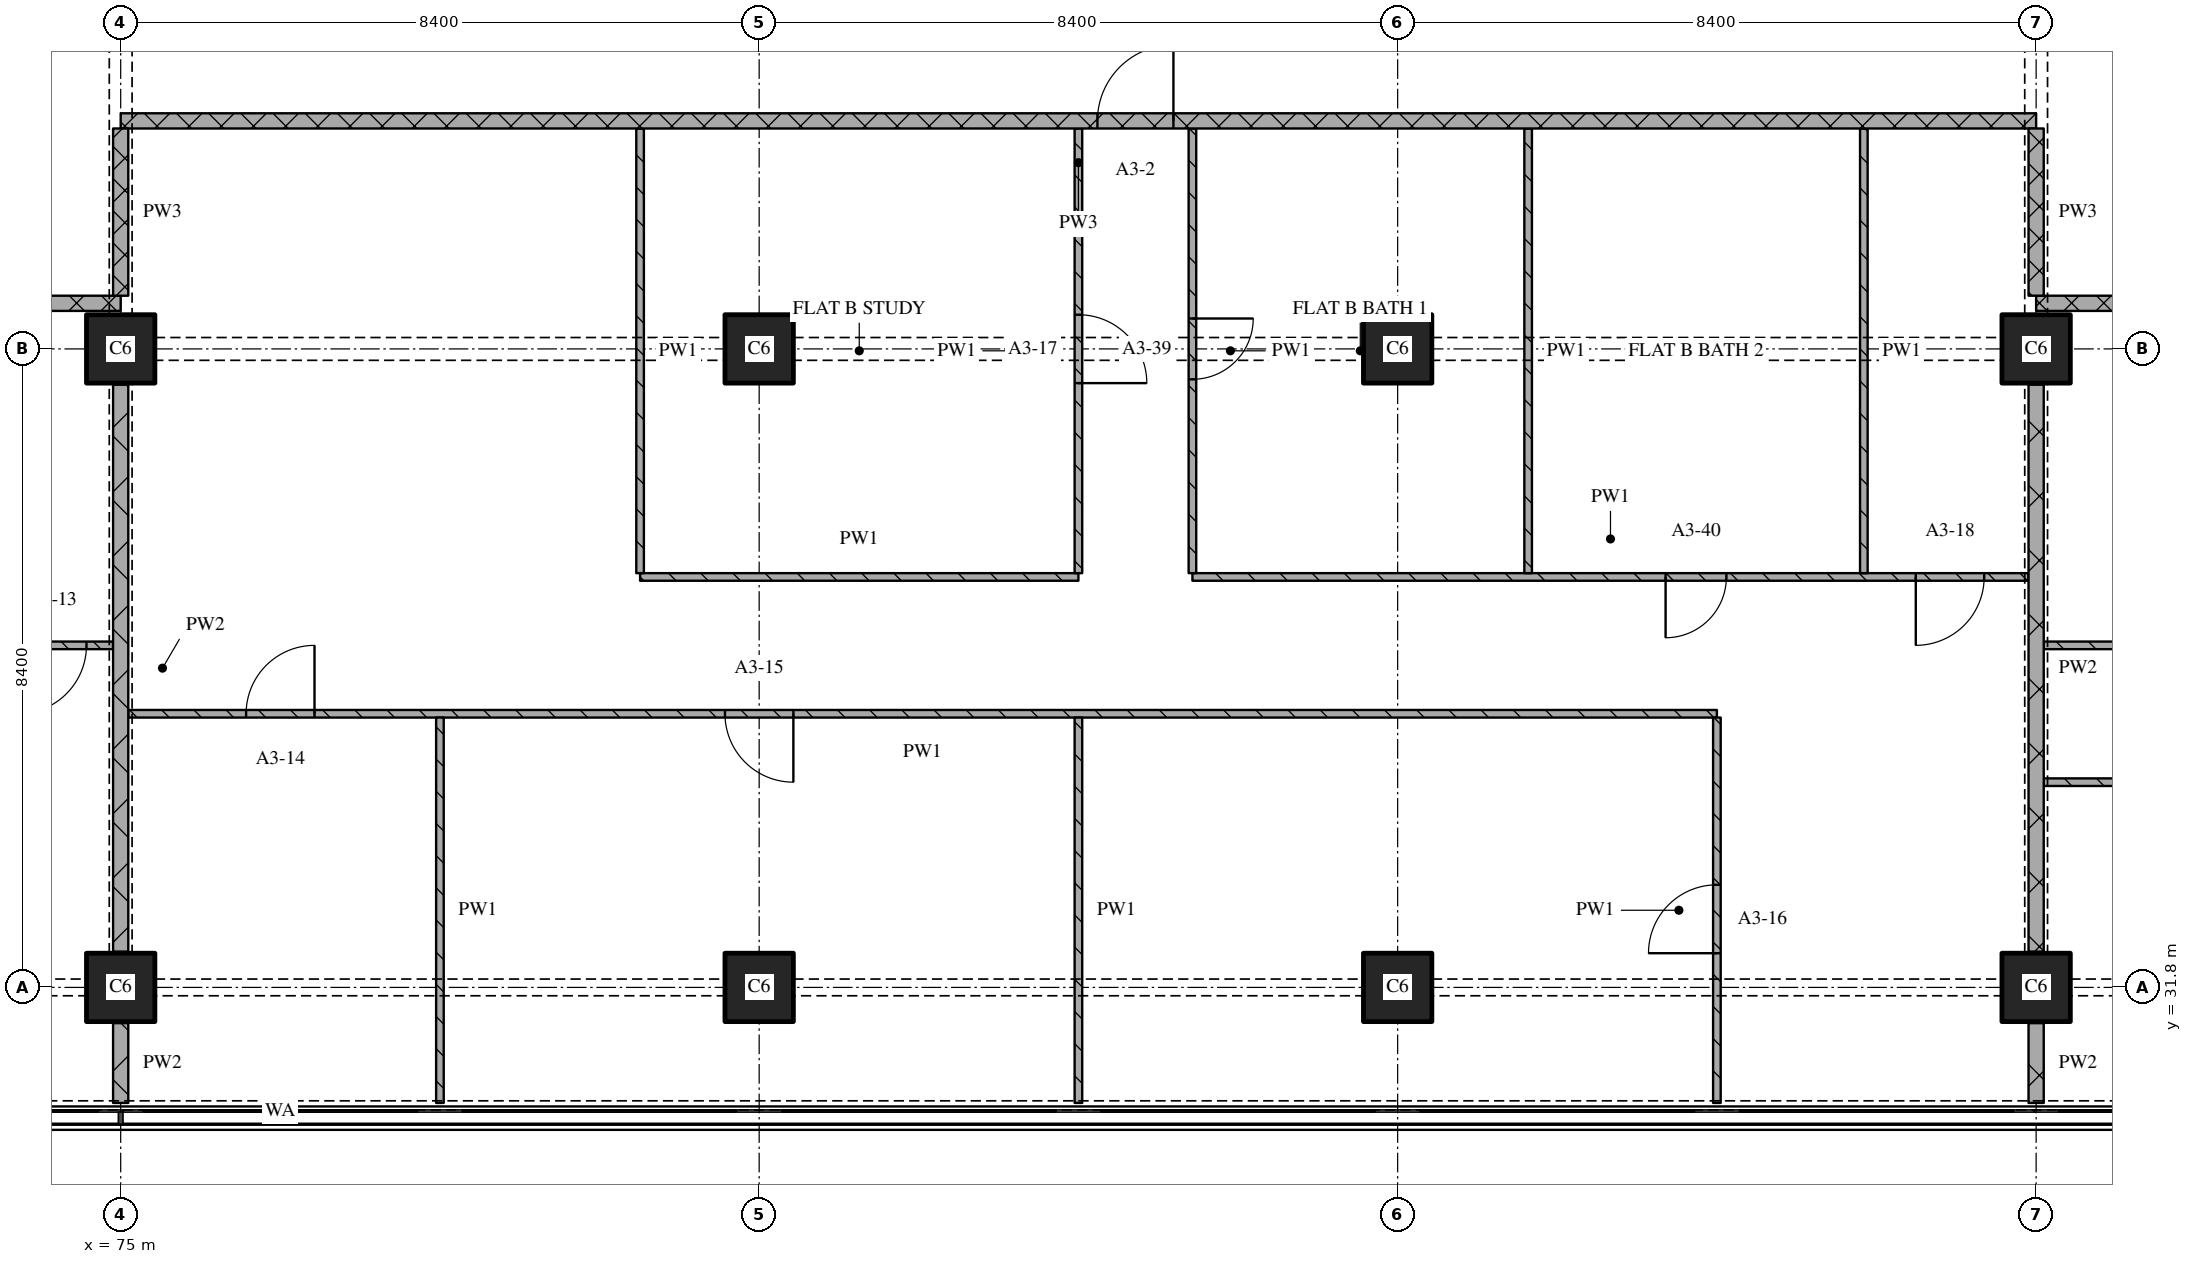
"""IFC4 building model, lengths in metres.
Left out: names, types, materials, properties, quantities, classifications, styles, units other than length and angle.
Written with IfcOpenShell. Run it as: python <this file> out.ifc"""

import sys

from ifc_helpers import new_model, si_unit, direction, frame, frame_2d, origin, origin_2d, place, context, subcontext, project, spatial, rectangle, extrude, element, fill, save


model = new_model("IFC4")
c1 = context("Model", 3, precision=1e-05, world=origin(), true_north=direction((0.0, 1.0)))
c2 = subcontext(c1, "Body", "Model", "MODEL_VIEW")
j1 = project(units=[si_unit("LENGTHUNIT", "METRE"), si_unit("PLANEANGLEUNIT", "RADIAN")], contexts=[c1])
p1 = place(None, origin())
s1 = spatial("IfcSite", under=j1, at=p1, CompositionType="ELEMENT")
p2 = place(p1, origin())
s2 = spatial("IfcBuilding", under=s1, at=p2, CompositionType="ELEMENT")
p3 = place(p2, frame((0.0, 0.0, 66.0)))
s3 = spatial("IfcBuildingStorey", under=s2, at=p3, CompositionType="ELEMENT", Elevation=66.0)
for number, where, z_axis, x_axis in (
    (1, (75.0, 31.8, 0.0), (0.0, 0.0, 1.0), (1.0, 0.0, 0.0)),
    (2, (75.0, 40.2, 0.0), (0.0, 0.0, 1.0), (1.0, 0.0, 0.0)),
    (3, (83.4, 31.8, 0.0), (0.0, 0.0, 1.0), (1.0, 0.0, 0.0)),
    (4, (83.4, 40.2, 0.0), (0.0, 0.0, 1.0), (1.0, 0.0, 0.0)),
    (5, (91.8, 31.8, 0.0), (0.0, 0.0, 1.0), (1.0, 0.0, 0.0)),
    (6, (91.8, 40.2, 0.0), (0.0, 0.0, 1.0), (1.0, 0.0, 0.0)),
    (7, (100.2, 31.8, 0.0), (0.0, 0.0, 1.0), (1.0, 0.0, 0.0)),
    (8, (100.2, 40.2, 0.0), (0.0, 0.0, 1.0), (1.0, 0.0, 0.0)),
):
    element("IfcColumn", number, at=place(p3, frame(where, z_axis=z_axis, x_axis=x_axis)), inside=s3, PredefinedType="COLUMN", context=c2, shape_type="SweptSolid", body=[
        extrude(rectangle(XDim=0.9, YDim=0.9, at=origin_2d()), origin(), (0.0, 0.0, 1.0), 3.6),
    ])
p4 = place(p3, frame((100.3, 34.5, 0.0), z_axis=(0.0, 0.0, 1.0), x_axis=(1.0, 0.0, 0.0)))
e9 = element("IfcWall", 9, at=p4, inside=s3, PredefinedType="PARTITIONING", context=c2, shape_type="SweptSolid", body=[
    extrude(rectangle(XDim=8.3, YDim=0.1, at=frame_2d((4.15, 0.0))), origin(), (0.0, 0.0, 1.0), 3.32),
])
p5 = place(p3, frame((96.0, 35.4, 0.0), z_axis=(0.0, 0.0, 1.0), x_axis=(-1.0, 0.0, 0.0)))
e10 = element("IfcWall", 10, at=p5, inside=s3, PredefinedType="PARTITIONING", context=c2, shape_type="SweptSolid", body=[
    extrude(rectangle(XDim=20.9, YDim=0.1, at=frame_2d((10.45, 0.0))), origin(), (0.0, 0.0, 1.0), 3.32),
])
p6 = place(p5, frame((12.15, 0.0, 0.0)))
e11 = element("IfcOpeningElement", 11, at=p6, cuts=e10, PredefinedType="OPENING", context=c2, shape_type="SweptSolid", body=[
    extrude(rectangle(XDim=0.9, YDim=2.1, at=frame_2d((0.45, 1.05))), frame((0.0, 0.06, 0.0), z_axis=(0.0, -1.0, 0.0), x_axis=(1.0, 0.0, 0.0)), (0.0, 0.0, 1.0), 0.12),
])
p7 = place(p5, frame((18.45, 0.0, 0.0)))
e12 = element("IfcOpeningElement", 12, at=p7, cuts=e10, PredefinedType="OPENING", context=c2, shape_type="SweptSolid", body=[
    extrude(rectangle(XDim=0.9, YDim=2.1, at=frame_2d((0.45, 1.05))), frame((0.0, 0.06, 0.0), z_axis=(0.0, -1.0, 0.0), x_axis=(1.0, 0.0, 0.0)), (0.0, 0.0, 1.0), 0.12),
])
p8 = place(p3, frame((64.2, 36.3, 0.0), z_axis=(0.0, 0.0, 1.0), x_axis=(1.0, 0.0, 0.0)))
e13 = element("IfcWall", 13, at=p8, inside=s3, PredefinedType="PARTITIONING", context=c2, shape_type="SweptSolid", body=[
    extrude(rectangle(XDim=10.7, YDim=0.1, at=frame_2d((5.35, 0.0))), origin(), (0.0, 0.0, 1.0), 3.32),
])
p9 = place(p8, frame((6.35, 0.0, 0.0)))
e14 = element("IfcOpeningElement", 14, at=p9, cuts=e13, PredefinedType="OPENING", context=c2, shape_type="SweptSolid", body=[
    extrude(rectangle(XDim=0.8, YDim=2.1, at=frame_2d((0.4, 1.05))), frame((0.0, 0.06, 0.0), z_axis=(0.0, -1.0, 0.0), x_axis=(1.0, 0.0, 0.0)), (0.0, 0.0, 1.0), 0.12),
])
p10 = place(p8, frame((9.45, 0.0, 0.0)))
e15 = element("IfcOpeningElement", 15, at=p10, cuts=e13, PredefinedType="OPENING", context=c2, shape_type="SweptSolid", body=[
    extrude(rectangle(XDim=0.9, YDim=2.1, at=frame_2d((0.45, 1.05))), frame((0.0, 0.06, 0.0), z_axis=(0.0, -1.0, 0.0), x_axis=(1.0, 0.0, 0.0)), (0.0, 0.0, 1.0), 0.12),
])
p11 = place(p3, frame((100.3, 36.3, 0.0), z_axis=(0.0, 0.0, 1.0), x_axis=(1.0, 0.0, 0.0)))
e16 = element("IfcWall", 16, at=p11, inside=s3, PredefinedType="PARTITIONING", context=c2, shape_type="SweptSolid", body=[
    extrude(rectangle(XDim=10.7, YDim=0.1, at=frame_2d((5.35, 0.0))), origin(), (0.0, 0.0, 1.0), 3.32),
])
p12 = place(p11, frame((1.75, 0.0, 0.0)))
e17 = element("IfcOpeningElement", 17, at=p12, cuts=e16, PredefinedType="OPENING", context=c2, shape_type="SweptSolid", body=[
    extrude(rectangle(XDim=0.8, YDim=2.1, at=frame_2d((0.4, 1.05))), frame((0.0, 0.06, 0.0), z_axis=(0.0, -1.0, 0.0), x_axis=(1.0, 0.0, 0.0)), (0.0, 0.0, 1.0), 0.12),
])
p13 = place(p11, frame((6.25, 0.0, 0.0)))
e18 = element("IfcOpeningElement", 18, at=p13, cuts=e16, PredefinedType="OPENING", context=c2, shape_type="SweptSolid", body=[
    extrude(rectangle(XDim=0.8, YDim=2.1, at=frame_2d((0.4, 1.05))), frame((0.0, 0.06, 0.0), z_axis=(0.0, -1.0, 0.0), x_axis=(1.0, 0.0, 0.0)), (0.0, 0.0, 1.0), 0.12),
])
p14 = place(p3, frame((81.833, 37.2, 0.0), z_axis=(0.0, 0.0, 1.0), x_axis=(1.0, 0.0, 0.0)))
e19 = element("IfcWall", 19, at=p14, inside=s3, PredefinedType="PARTITIONING", context=c2, shape_type="SweptSolid", body=[
    extrude(rectangle(XDim=5.767, YDim=0.1, at=frame_2d((2.883, 0.0))), origin(), (0.0, 0.0, 1.0), 3.32),
])
p15 = place(p3, frame((89.1, 37.2, 0.0), z_axis=(0.0, 0.0, 1.0), x_axis=(1.0, 0.0, 0.0)))
e20 = element("IfcWall", 20, at=p15, inside=s3, PredefinedType="PARTITIONING", context=c2, shape_type="SweptSolid", body=[
    extrude(rectangle(XDim=11.0, YDim=0.1, at=frame_2d((5.5, 0.0))), origin(), (0.0, 0.0, 1.0), 3.32),
])
p16 = place(p15, frame((6.225, 0.0, 0.0)))
e21 = element("IfcOpeningElement", 21, at=p16, cuts=e20, PredefinedType="OPENING", context=c2, shape_type="SweptSolid", body=[
    extrude(rectangle(XDim=0.8, YDim=2.1, at=frame_2d((0.4, 1.05))), frame((0.0, 0.06, 0.0), z_axis=(0.0, -1.0, 0.0), x_axis=(1.0, 0.0, 0.0)), (0.0, 0.0, 1.0), 0.12),
])
p17 = place(p15, frame((9.517, 0.0, 0.0)))
e22 = element("IfcOpeningElement", 22, at=p17, cuts=e20, PredefinedType="OPENING", context=c2, shape_type="SweptSolid", body=[
    extrude(rectangle(XDim=0.9, YDim=2.1, at=frame_2d((0.45, 1.05))), frame((0.0, 0.06, 0.0), z_axis=(0.0, -1.0, 0.0), x_axis=(1.0, 0.0, 0.0)), (0.0, 0.0, 1.0), 0.12),
])
p18 = place(p3, frame((75.0, 40.8, 0.0), z_axis=(0.0, 0.0, 1.0), x_axis=(-1.0, 0.0, 0.0)))
e23 = element("IfcWall", 23, at=p18, inside=s3, PredefinedType="PARTITIONING", context=c2, shape_type="SweptSolid", body=[
    extrude(rectangle(XDim=24.08, YDim=0.2, at=frame_2d((12.04, 0.0))), origin(), (0.0, 0.0, 1.0), 3.32),
])
p19 = place(p18, frame((11.05, 0.0, 0.0)))
e24 = element("IfcOpeningElement", 24, at=p19, cuts=e23, PredefinedType="OPENING", context=c2, shape_type="SweptSolid", body=[
    extrude(rectangle(XDim=1.0, YDim=2.1, at=frame_2d((0.5, 1.05))), frame((0.0, 0.11, 0.0), z_axis=(0.0, -1.0, 0.0), x_axis=(1.0, 0.0, 0.0)), (0.0, 0.0, 1.0), 0.22),
])
p20 = place(p3, frame((124.28, 40.8, 0.0), z_axis=(0.0, 0.0, 1.0), x_axis=(-1.0, 0.0, 0.0)))
e25 = element("IfcWall", 25, at=p20, inside=s3, PredefinedType="PARTITIONING", context=c2, shape_type="SweptSolid", body=[
    extrude(rectangle(XDim=24.08, YDim=0.2, at=frame_2d((12.04, 0.0))), origin(), (0.0, 0.0, 1.0), 3.32),
])
p21 = place(p20, frame((12.03, 0.0, 0.0)))
e26 = element("IfcOpeningElement", 26, at=p21, cuts=e25, PredefinedType="OPENING", context=c2, shape_type="SweptSolid", body=[
    extrude(rectangle(XDim=1.0, YDim=2.1, at=frame_2d((0.5, 1.05))), frame((0.0, 0.11, 0.0), z_axis=(0.0, -1.0, 0.0), x_axis=(1.0, 0.0, 0.0)), (0.0, 0.0, 1.0), 0.22),
])
p22 = place(p3, frame((100.2, 43.2, 0.0), z_axis=(0.0, 0.0, 1.0), x_axis=(-1.0, 0.0, 0.0)))
e27 = element("IfcWall", 27, at=p22, inside=s3, PredefinedType="PARTITIONING", context=c2, shape_type="SweptSolid", body=[
    extrude(rectangle(XDim=25.2, YDim=0.2, at=frame_2d((12.6, 0.0))), origin(), (0.0, 0.0, 1.0), 3.32),
])
p23 = place(p22, frame((11.35, 0.0, 0.0)))
e28 = element("IfcOpeningElement", 28, at=p23, cuts=e27, PredefinedType="OPENING", context=c2, shape_type="SweptSolid", body=[
    extrude(rectangle(XDim=1.0, YDim=2.1, at=frame_2d((0.5, 1.05))), frame((0.0, 0.11, 0.0), z_axis=(0.0, -1.0, 0.0), x_axis=(1.0, 0.0, 0.0)), (0.0, 0.0, 1.0), 0.22),
])
p24 = place(p3, frame((75.0, 43.1, 0.0), z_axis=(0.0, 0.0, 1.0), x_axis=(0.0, -1.0, 0.0)))
e29 = element("IfcWall", 29, at=p24, inside=s3, PredefinedType="PARTITIONING", context=c2, shape_type="SweptSolid", body=[
    extrude(rectangle(XDim=2.2, YDim=0.2, at=frame_2d((1.1, 0.0))), origin(), (0.0, 0.0, 1.0), 2.43),
])
p25 = place(p3, frame((75.0, 31.33, 0.0), z_axis=(0.0, 0.0, 1.0), x_axis=(0.0, -1.0, 0.0)))
e30 = element("IfcWall", 30, at=p25, inside=s3, PredefinedType="PARTITIONING", context=c2, shape_type="SweptSolid", body=[
    extrude(rectangle(XDim=1.05, YDim=0.2, at=frame_2d((0.525, 0.0))), origin(), (0.0, 0.0, 1.0), 3.32),
])
p26 = place(p3, frame((75.0, 39.73, 0.0), z_axis=(0.0, 0.0, 1.0), x_axis=(0.0, -1.0, 0.0)))
e31 = element("IfcWall", 31, at=p26, inside=s3, PredefinedType="PARTITIONING", context=c2, shape_type="SweptSolid", body=[
    extrude(rectangle(XDim=7.46, YDim=0.2, at=frame_2d((3.73, 0.0))), origin(), (0.0, 0.0, 1.0), 2.83),
])
p27 = place(p3, frame((79.2, 35.35, 0.0), z_axis=(0.0, 0.0, 1.0), x_axis=(0.0, -1.0, 0.0)))
e32 = element("IfcWall", 32, at=p27, inside=s3, PredefinedType="PARTITIONING", context=c2, shape_type="SweptSolid", body=[
    extrude(rectangle(XDim=5.07, YDim=0.1, at=frame_2d((2.535, 0.0))), origin(), (0.0, 0.0, 1.0), 3.32),
])
p28 = place(p3, frame((81.833, 43.1, 0.0), z_axis=(0.0, 0.0, 1.0), x_axis=(0.0, -1.0, 0.0)))
e33 = element("IfcWall", 33, at=p28, inside=s3, PredefinedType="PARTITIONING", context=c2, shape_type="SweptSolid", body=[
    extrude(rectangle(XDim=5.85, YDim=0.1, at=frame_2d((2.925, 0.0))), origin(), (0.0, 0.0, 1.0), 3.32),
])
p29 = place(p3, frame((87.6, 35.35, 0.0), z_axis=(0.0, 0.0, 1.0), x_axis=(0.0, -1.0, 0.0)))
e34 = element("IfcWall", 34, at=p29, inside=s3, PredefinedType="PARTITIONING", context=c2, shape_type="SweptSolid", body=[
    extrude(rectangle(XDim=5.07, YDim=0.1, at=frame_2d((2.535, 0.0))), origin(), (0.0, 0.0, 1.0), 3.32),
])
p30 = place(p3, frame((87.6, 37.25, 0.0), z_axis=(0.0, 0.0, 1.0), x_axis=(0.0, 1.0, 0.0)))
e35 = element("IfcWall", 35, at=p30, inside=s3, PredefinedType="PARTITIONING", context=c2, shape_type="SweptSolid", body=[
    extrude(rectangle(XDim=5.85, YDim=0.1, at=frame_2d((2.925, 0.0))), origin(), (0.0, 0.0, 1.0), 3.32),
])
p31 = place(p30, frame((2.5, 0.0, 0.0)))
e36 = element("IfcOpeningElement", 36, at=p31, cuts=e35, PredefinedType="OPENING", context=c2, shape_type="SweptSolid", body=[
    extrude(rectangle(XDim=0.9, YDim=2.1, at=frame_2d((0.45, 1.05))), frame((0.0, 0.06, 0.0), z_axis=(0.0, -1.0, 0.0), x_axis=(1.0, 0.0, 0.0)), (0.0, 0.0, 1.0), 0.12),
])
p32 = place(p3, frame((89.1, 43.1, 0.0), z_axis=(0.0, 0.0, 1.0), x_axis=(0.0, -1.0, 0.0)))
e37 = element("IfcWall", 37, at=p32, inside=s3, PredefinedType="PARTITIONING", context=c2, shape_type="SweptSolid", body=[
    extrude(rectangle(XDim=5.85, YDim=0.1, at=frame_2d((2.925, 0.0))), origin(), (0.0, 0.0, 1.0), 3.32),
])
p33 = place(p32, frame((2.5, 0.0, 0.0)))
e38 = element("IfcOpeningElement", 38, at=p33, cuts=e37, PredefinedType="OPENING", context=c2, shape_type="SweptSolid", body=[
    extrude(rectangle(XDim=0.8, YDim=2.1, at=frame_2d((0.4, 1.05))), frame((0.0, 0.06, 0.0), z_axis=(0.0, -1.0, 0.0), x_axis=(1.0, 0.0, 0.0)), (0.0, 0.0, 1.0), 0.12),
])
p34 = place(p3, frame((93.517, 43.1, 0.0), z_axis=(0.0, 0.0, 1.0), x_axis=(0.0, -1.0, 0.0)))
e39 = element("IfcWall", 39, at=p34, inside=s3, PredefinedType="PARTITIONING", context=c2, shape_type="SweptSolid", body=[
    extrude(rectangle(XDim=5.85, YDim=0.1, at=frame_2d((2.925, 0.0))), origin(), (0.0, 0.0, 1.0), 3.32),
])
p35 = place(p3, frame((96.0, 30.28, 0.0), z_axis=(0.0, 0.0, 1.0), x_axis=(0.0, 1.0, 0.0)))
e40 = element("IfcWall", 40, at=p35, inside=s3, PredefinedType="PARTITIONING", context=c2, shape_type="SweptSolid", body=[
    extrude(rectangle(XDim=5.07, YDim=0.1, at=frame_2d((2.535, 0.0))), origin(), (0.0, 0.0, 1.0), 3.32),
])
p36 = place(p35, frame((1.97, 0.0, 0.0)))
e41 = element("IfcOpeningElement", 41, at=p36, cuts=e40, PredefinedType="OPENING", context=c2, shape_type="SweptSolid", body=[
    extrude(rectangle(XDim=0.9, YDim=2.1, at=frame_2d((0.45, 1.05))), frame((0.0, 0.06, 0.0), z_axis=(0.0, -1.0, 0.0), x_axis=(1.0, 0.0, 0.0)), (0.0, 0.0, 1.0), 0.12),
])
p37 = place(p3, frame((97.933, 43.1, 0.0), z_axis=(0.0, 0.0, 1.0), x_axis=(0.0, -1.0, 0.0)))
e42 = element("IfcWall", 42, at=p37, inside=s3, PredefinedType="PARTITIONING", context=c2, shape_type="SweptSolid", body=[
    extrude(rectangle(XDim=5.85, YDim=0.1, at=frame_2d((2.925, 0.0))), origin(), (0.0, 0.0, 1.0), 3.32),
])
p38 = place(p3, frame((100.2, 43.1, 0.0), z_axis=(0.0, 0.0, 1.0), x_axis=(0.0, -1.0, 0.0)))
e43 = element("IfcWall", 43, at=p38, inside=s3, PredefinedType="PARTITIONING", context=c2, shape_type="SweptSolid", body=[
    extrude(rectangle(XDim=2.2, YDim=0.2, at=frame_2d((1.1, 0.0))), origin(), (0.0, 0.0, 1.0), 2.43),
])
p39 = place(p3, frame((100.2, 31.33, 0.0), z_axis=(0.0, 0.0, 1.0), x_axis=(0.0, -1.0, 0.0)))
e44 = element("IfcWall", 44, at=p39, inside=s3, PredefinedType="PARTITIONING", context=c2, shape_type="SweptSolid", body=[
    extrude(rectangle(XDim=1.05, YDim=0.2, at=frame_2d((0.525, 0.0))), origin(), (0.0, 0.0, 1.0), 3.32),
])
p40 = place(p3, frame((100.2, 39.73, 0.0), z_axis=(0.0, 0.0, 1.0), x_axis=(0.0, -1.0, 0.0)))
e45 = element("IfcWall", 45, at=p40, inside=s3, PredefinedType="PARTITIONING", context=c2, shape_type="SweptSolid", body=[
    extrude(rectangle(XDim=7.46, YDim=0.2, at=frame_2d((3.73, 0.0))), origin(), (0.0, 0.0, 1.0), 2.83),
])
p41 = place(p6, origin())
e46 = element("IfcDoor", 46, at=p41, inside=s3, OperationType="SINGLE_SWING_LEFT", PredefinedType="DOOR", context=c2, shape_type="SweptSolid", body=[
    extrude(rectangle(XDim=0.9, YDim=2.1, at=frame_2d((0.45, 1.05))), frame((0.0, 0.025, 0.0), z_axis=(0.0, -1.0, 0.0), x_axis=(1.0, 0.0, 0.0)), (0.0, 0.0, 1.0), 0.05),
])
fill(e11, e46)
p42 = place(p7, origin())
e47 = element("IfcDoor", 47, at=p42, inside=s3, OperationType="SINGLE_SWING_RIGHT", PredefinedType="DOOR", context=c2, shape_type="SweptSolid", body=[
    extrude(rectangle(XDim=0.9, YDim=2.1, at=frame_2d((0.45, 1.05))), frame((0.0, 0.025, 0.0), z_axis=(0.0, -1.0, 0.0), x_axis=(1.0, 0.0, 0.0)), (0.0, 0.0, 1.0), 0.05),
])
fill(e12, e47)
p43 = place(p10, origin())
e48 = element("IfcDoor", 48, at=p43, inside=s3, OperationType="SINGLE_SWING_RIGHT", PredefinedType="DOOR", context=c2, shape_type="SweptSolid", body=[
    extrude(rectangle(XDim=0.9, YDim=2.1, at=frame_2d((0.45, 1.05))), frame((0.0, 0.025, 0.0), z_axis=(0.0, -1.0, 0.0), x_axis=(1.0, 0.0, 0.0)), (0.0, 0.0, 1.0), 0.05),
])
fill(e15, e48)
p44 = place(p16, origin())
e49 = element("IfcDoor", 49, at=p44, inside=s3, OperationType="SINGLE_SWING_RIGHT", PredefinedType="DOOR", context=c2, shape_type="SweptSolid", body=[
    extrude(rectangle(XDim=0.8, YDim=2.1, at=frame_2d((0.4, 1.05))), frame((0.0, 0.025, 0.0), z_axis=(0.0, -1.0, 0.0), x_axis=(1.0, 0.0, 0.0)), (0.0, 0.0, 1.0), 0.05),
])
fill(e21, e49)
p45 = place(p17, origin())
e50 = element("IfcDoor", 50, at=p45, inside=s3, OperationType="SINGLE_SWING_RIGHT", PredefinedType="DOOR", context=c2, shape_type="SweptSolid", body=[
    extrude(rectangle(XDim=0.9, YDim=2.1, at=frame_2d((0.45, 1.05))), frame((0.0, 0.025, 0.0), z_axis=(0.0, -1.0, 0.0), x_axis=(1.0, 0.0, 0.0)), (0.0, 0.0, 1.0), 0.05),
])
fill(e22, e50)
p46 = place(p23, origin())
e51 = element("IfcDoor", 51, at=p46, inside=s3, OperationType="SINGLE_SWING_RIGHT", PredefinedType="DOOR", context=c2, shape_type="SweptSolid", body=[
    extrude(rectangle(XDim=1.0, YDim=2.1, at=frame_2d((0.5, 1.05))), frame((0.0, 0.025, 0.0), z_axis=(0.0, -1.0, 0.0), x_axis=(1.0, 0.0, 0.0)), (0.0, 0.0, 1.0), 0.05),
])
fill(e28, e51)
p47 = place(p31, origin())
e52 = element("IfcDoor", 52, at=p47, inside=s3, OperationType="SINGLE_SWING_RIGHT", PredefinedType="DOOR", context=c2, shape_type="SweptSolid", body=[
    extrude(rectangle(XDim=0.9, YDim=2.1, at=frame_2d((0.45, 1.05))), frame((0.0, 0.025, 0.0), z_axis=(0.0, -1.0, 0.0), x_axis=(1.0, 0.0, 0.0)), (0.0, 0.0, 1.0), 0.05),
])
fill(e36, e52)
p48 = place(p33, origin())
e53 = element("IfcDoor", 53, at=p48, inside=s3, OperationType="SINGLE_SWING_LEFT", PredefinedType="DOOR", context=c2, shape_type="SweptSolid", body=[
    extrude(rectangle(XDim=0.8, YDim=2.1, at=frame_2d((0.4, 1.05))), frame((0.0, 0.025, 0.0), z_axis=(0.0, -1.0, 0.0), x_axis=(1.0, 0.0, 0.0)), (0.0, 0.0, 1.0), 0.05),
])
fill(e38, e53)
p49 = place(p36, origin())
e54 = element("IfcDoor", 54, at=p49, inside=s3, OperationType="SINGLE_SWING_LEFT", PredefinedType="DOOR", context=c2, shape_type="SweptSolid", body=[
    extrude(rectangle(XDim=0.9, YDim=2.1, at=frame_2d((0.45, 1.05))), frame((0.0, 0.025, 0.0), z_axis=(0.0, -1.0, 0.0), x_axis=(1.0, 0.0, 0.0)), (0.0, 0.0, 1.0), 0.05),
])
fill(e41, e54)
save(model, sys.argv[1])
